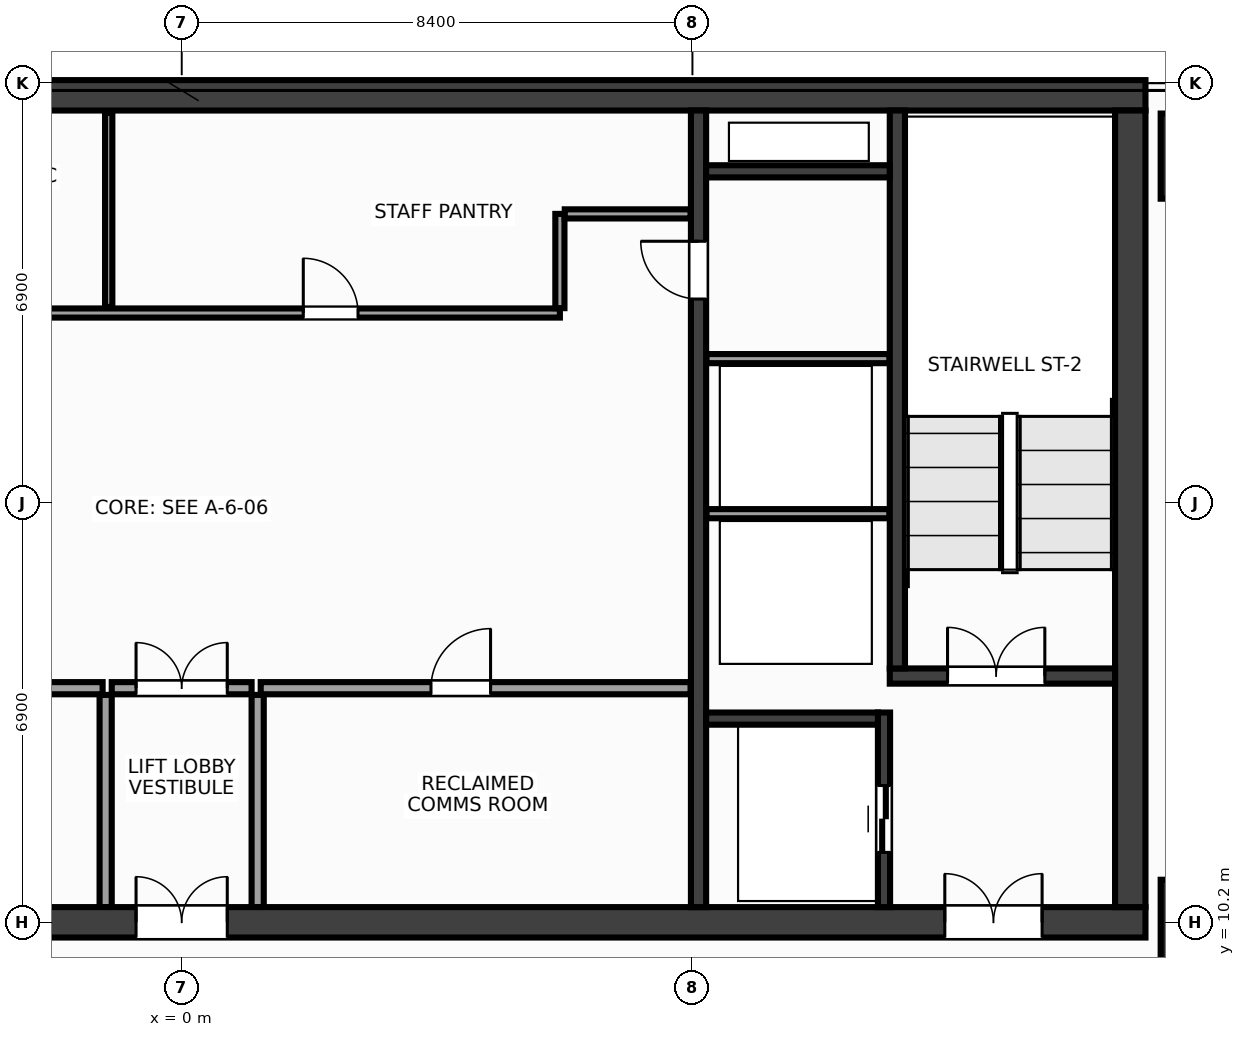
"""IFC4 building model, lengths in metres.
Left out: names, types, materials, properties, quantities, classifications, styles, units other than length and angle.
Written with IfcOpenShell. Run it as: python <this file> out.ifc"""

import sys

from ifc_helpers import new_model, si_unit, direction, frame, frame_2d, origin, origin_2d, place, context, subcontext, project, spatial, rectangle, extrude, source, transform, mapped, element, fill, save


model = new_model("IFC4")
c1 = context("Model", 3, precision=1e-05, world=origin(), true_north=direction((0.0, 1.0)))
c2 = subcontext(c1, "Body", "Model", "MODEL_VIEW")
j1 = project(units=[si_unit("LENGTHUNIT", "METRE"), si_unit("PLANEANGLEUNIT", "RADIAN")], contexts=[c1])
p1 = place(None, origin())
s1 = spatial("IfcSite", under=j1, at=p1, CompositionType="ELEMENT")
p2 = place(p1, origin())
s2 = spatial("IfcBuilding", under=s1, at=p2, CompositionType="ELEMENT")
p3 = place(p2, frame((0.0, 0.0, 203.6)))
s3 = spatial("IfcBuildingStorey", under=s2, at=p3, CompositionType="ELEMENT", Elevation=203.6)
m1 = source(origin(), c2, "Body", "SweptSolid", [
    extrude(rectangle(XDim=31.7, YDim=0.5, at=frame_2d((15.85, 0.0))), origin(), (0.0, 0.0, 1.0), 3.6),
])
p4 = place(p3, frame((-15.85, 23.8, 0.0), z_axis=(0.0, 0.0, 1.0), x_axis=(1.0, 0.0, 0.0)))
e1 = element("IfcWall", 1, at=p4, inside=s3, PredefinedType="SHEAR", context=c2, shape_type="MappedRepresentation", body=[
    mapped(m1, transform((0.0, 0.0, 0.0), x_axis=(1.0, 0.0, 0.0), y_axis=(0.0, 1.0, 0.0), z_axis=(0.0, 0.0, 1.0), scale=1.0)),
])
p5 = place(p3, frame((-15.85, 10.2, 0.0), z_axis=(0.0, 0.0, 1.0), x_axis=(1.0, 0.0, 0.0)))
e2 = element("IfcWall", 2, at=p5, inside=s3, PredefinedType="SHEAR", context=c2, shape_type="MappedRepresentation", body=[
    mapped(m1, transform((0.0, 0.0, 0.0), x_axis=(1.0, 0.0, 0.0), y_axis=(0.0, 1.0, 0.0), z_axis=(0.0, 0.0, 1.0), scale=1.0)),
])
p6 = place(p5, frame((1.7, 0.0, 0.0)))
e3 = element("IfcOpeningElement", 3, at=p6, cuts=e2, PredefinedType="OPENING", context=c2, shape_type="SweptSolid", body=[
    extrude(rectangle(XDim=1.6, YDim=2.15, at=frame_2d((0.8, 1.075))), frame((0.0, 0.262, 0.0), z_axis=(0.0, -1.0, 0.0), x_axis=(1.0, 0.0, 0.0)), (0.0, 0.0, 1.0), 0.524),
])
p7 = place(p5, frame((28.4, 0.0, 0.0)))
e4 = element("IfcOpeningElement", 4, at=p7, cuts=e2, PredefinedType="OPENING", context=c2, shape_type="SweptSolid", body=[
    extrude(rectangle(XDim=1.6, YDim=2.15, at=frame_2d((0.8, 1.075))), frame((0.0, 0.262, 0.0), z_axis=(0.0, -1.0, 0.0), x_axis=(1.0, 0.0, 0.0)), (0.0, 0.0, 1.0), 0.524),
])
p8 = place(p5, frame((15.1, 0.0, 0.0)))
e5 = element("IfcOpeningElement", 5, at=p8, cuts=e2, PredefinedType="OPENING", context=c2, shape_type="SweptSolid", body=[
    extrude(rectangle(XDim=1.5, YDim=2.2, at=frame_2d((0.75, 1.1))), frame((0.0, 0.262, 0.0), z_axis=(0.0, -1.0, 0.0), x_axis=(1.0, 0.0, 0.0)), (0.0, 0.0, 1.0), 0.524),
])
m2 = source(origin(), c2, "Body", "SweptSolid", [
    extrude(rectangle(XDim=13.1, YDim=0.5, at=frame_2d((6.55, 0.0))), origin(), (0.0, 0.0, 1.0), 3.6),
])
p9 = place(p3, frame((15.6, 10.45, 0.0), z_axis=(0.0, 0.0, 1.0), x_axis=(0.0, 1.0, 0.0)))
e6 = element("IfcWall", 6, at=p9, inside=s3, PredefinedType="SHEAR", context=c2, shape_type="MappedRepresentation", body=[
    mapped(m2, transform((0.0, 0.0, 0.0), x_axis=(1.0, 0.0, 0.0), y_axis=(0.0, 1.0, 0.0), z_axis=(0.0, 0.0, 1.0), scale=1.0)),
])
m3 = source(origin(), c2, "Body", "SweptSolid", [
    extrude(rectangle(XDim=13.1, YDim=0.25, at=frame_2d((6.55, 0.0))), origin(), (0.0, 0.0, 1.0), 3.6),
])
p10 = place(p3, frame((8.5, 10.45, 0.0), z_axis=(0.0, 0.0, 1.0), x_axis=(0.0, 1.0, 0.0)))
e7 = element("IfcWall", 7, at=p10, inside=s3, PredefinedType="SHEAR", context=c2, shape_type="MappedRepresentation", body=[
    mapped(m3, transform((0.0, 0.0, 0.0), x_axis=(1.0, 0.0, 0.0), y_axis=(0.0, 1.0, 0.0), z_axis=(0.0, 0.0, 1.0), scale=1.0)),
])
p11 = place(p10, frame((10.0, 0.0, 0.0)))
e8 = element("IfcOpeningElement", 8, at=p11, cuts=e7, PredefinedType="OPENING", context=c2, shape_type="SweptSolid", body=[
    extrude(rectangle(XDim=0.95, YDim=2.15, at=frame_2d((0.475, 1.075))), frame((0.0, 0.137, 0.0), z_axis=(0.0, -1.0, 0.0), x_axis=(1.0, 0.0, 0.0)), (0.0, 0.0, 1.0), 0.274),
])
m4 = source(origin(), c2, "Body", "SweptSolid", [
    extrude(rectangle(XDim=3.705, YDim=0.25, at=frame_2d((1.853, 0.0))), origin(), (0.0, 0.0, 1.0), 3.6),
])
p12 = place(p3, frame((11.645, 14.25, 0.0), z_axis=(0.0, 0.0, 1.0), x_axis=(1.0, 0.0, 0.0)))
e9 = element("IfcWall", 9, at=p12, inside=s3, PredefinedType="SHEAR", context=c2, shape_type="MappedRepresentation", body=[
    mapped(m4, transform((0.0, 0.0, 0.0), x_axis=(1.0, 0.0, 0.0), y_axis=(0.0, 1.0, 0.0), z_axis=(0.0, 0.0, 1.0), scale=1.0)),
])
p13 = place(p12, frame((0.95, 0.0, 0.0)))
e10 = element("IfcOpeningElement", 10, at=p13, cuts=e9, PredefinedType="OPENING", context=c2, shape_type="SweptSolid", body=[
    extrude(rectangle(XDim=1.6, YDim=2.15, at=frame_2d((0.8, 1.075))), frame((0.0, 0.137, 0.0), z_axis=(0.0, -1.0, 0.0), x_axis=(1.0, 0.0, 0.0)), (0.0, 0.0, 1.0), 0.274),
])
m5 = source(origin(), c2, "Body", "SweptSolid", [
    extrude(rectangle(XDim=9.175, YDim=0.25, at=frame_2d((4.587, 0.0))), origin(), (0.0, 0.0, 1.0), 3.6),
])
p14 = place(p3, frame((11.77, 14.375, 0.0), z_axis=(0.0, 0.0, 1.0), x_axis=(0.0, 1.0, 0.0)))
e11 = element("IfcWall", 11, at=p14, inside=s3, PredefinedType="SHEAR", context=c2, shape_type="MappedRepresentation", body=[
    mapped(m5, transform((0.0, 0.0, 0.0), x_axis=(1.0, 0.0, 0.0), y_axis=(0.0, 1.0, 0.0), z_axis=(0.0, 0.0, 1.0), scale=1.0)),
])
m6 = source(origin(), c2, "Body", "SweptSolid", [
    extrude(rectangle(XDim=3.2, YDim=0.2, at=frame_2d((1.6, 0.0))), origin(), (0.0, 0.0, 1.0), 3.6),
])
p15 = place(p3, frame((11.55, 10.45, 0.0), z_axis=(0.0, 0.0, 1.0), x_axis=(0.0, 1.0, 0.0)))
e12 = element("IfcWall", 12, at=p15, inside=s3, PredefinedType="SHEAR", context=c2, shape_type="MappedRepresentation", body=[
    mapped(m6, transform((0.0, 0.0, 0.0), x_axis=(1.0, 0.0, 0.0), y_axis=(0.0, 1.0, 0.0), z_axis=(0.0, 0.0, 1.0), scale=1.0)),
])
p16 = place(p15, frame((0.9, 0.0, 0.0)))
e13 = element("IfcOpeningElement", 13, at=p16, cuts=e12, PredefinedType="OPENING", context=c2, shape_type="SweptSolid", body=[
    extrude(rectangle(XDim=1.1, YDim=2.15, at=frame_2d((0.55, 1.075))), frame((0.0, 0.112, 0.0), z_axis=(0.0, -1.0, 0.0), x_axis=(1.0, 0.0, 0.0)), (0.0, 0.0, 1.0), 0.224),
])
m7 = source(origin(), c2, "Body", "SweptSolid", [
    extrude(rectangle(XDim=2.825, YDim=0.2, at=frame_2d((1.413, 0.0))), origin(), (0.0, 0.0, 1.0), 3.6),
])
p17 = place(p3, frame((8.625, 13.55, 0.0), z_axis=(0.0, 0.0, 1.0), x_axis=(1.0, 0.0, 0.0)))
e14 = element("IfcWall", 14, at=p17, inside=s3, PredefinedType="SHEAR", context=c2, shape_type="MappedRepresentation", body=[
    mapped(m7, transform((0.0, 0.0, 0.0), x_axis=(1.0, 0.0, 0.0), y_axis=(0.0, 1.0, 0.0), z_axis=(0.0, 0.0, 1.0), scale=1.0)),
])
m8 = source(origin(), c2, "Body", "SweptSolid", [
    extrude(rectangle(XDim=3.02, YDim=0.2, at=frame_2d((1.51, 0.0))), origin(), (0.0, 0.0, 1.0), 3.6),
])
p18 = place(p3, frame((8.625, 22.55, 0.0), z_axis=(0.0, 0.0, 1.0), x_axis=(1.0, 0.0, 0.0)))
e15 = element("IfcWall", 15, at=p18, inside=s3, PredefinedType="SHEAR", context=c2, shape_type="MappedRepresentation", body=[
    mapped(m8, transform((0.0, 0.0, 0.0), x_axis=(1.0, 0.0, 0.0), y_axis=(0.0, 1.0, 0.0), z_axis=(0.0, 0.0, 1.0), scale=1.0)),
])
m9 = source(origin(), c2, "Body", "SweptSolid", [
    extrude(rectangle(XDim=1.4, YDim=1.4, at=origin_2d()), origin(), (0.0, 0.0, 1.0), 3.6),
])
for number, where, z_axis, x_axis in (
    (16, (16.8, 10.2, 0.0), (0.0, 0.0, 1.0), (1.0, 0.0, 0.0)),
    (17, (16.8, 22.8, 0.0), (0.0, 0.0, 1.0), (1.0, 0.0, 0.0)),
):
    element("IfcColumn", number, at=place(p3, frame(where, z_axis=z_axis, x_axis=x_axis)), inside=s3, PredefinedType="COLUMN", context=c2, shape_type="MappedRepresentation", body=[
        mapped(m9, transform((0.0, 0.0, 0.0), x_axis=(1.0, 0.0, 0.0), y_axis=(0.0, 1.0, 0.0), z_axis=(0.0, 0.0, 1.0), scale=1.0)),
    ])
m10 = source(origin(), c2, "Body", "SweptSolid", [
    extrude(rectangle(XDim=3.01, YDim=0.15, at=frame_2d((1.505, 0.0))), origin(), (0.0, 0.0, 1.0), 3.38),
])
for number, where, z_axis, x_axis in (
    (18, (8.63, 16.92, 0.0), (0.0, 0.0, 1.0), (1.0, 0.0, 0.0)),
    (19, (8.63, 19.47, 0.0), (0.0, 0.0, 1.0), (1.0, 0.0, 0.0)),
):
    element("IfcWall", number, at=place(p3, frame(where, z_axis=z_axis, x_axis=x_axis)), inside=s3, PredefinedType="PARTITIONING", context=c2, shape_type="MappedRepresentation", body=[
        mapped(m10, transform((0.0, 0.0, 0.0), x_axis=(1.0, 0.0, 0.0), y_axis=(0.0, 1.0, 0.0), z_axis=(0.0, 0.0, 1.0), scale=1.0)),
    ])
m11 = source(origin(), c2, "Body", "SweptSolid", [
    extrude(rectangle(XDim=7.07, YDim=0.2, at=frame_2d((3.535, 0.0))), origin(), (0.0, 0.0, 1.0), 3.38),
])
p19 = place(p3, frame((-8.37, 14.05, 0.0), z_axis=(0.0, 0.0, 1.0), x_axis=(1.0, 0.0, 0.0)))
e20 = element("IfcWall", 20, at=p19, inside=s3, PredefinedType="PARTITIONING", context=c2, shape_type="MappedRepresentation", body=[
    mapped(m11, transform((0.0, 0.0, 0.0), x_axis=(1.0, 0.0, 0.0), y_axis=(0.0, 1.0, 0.0), z_axis=(0.0, 0.0, 1.0), scale=1.0)),
])
p20 = place(p19, frame((2.8, 0.0, 0.0)))
e21 = element("IfcOpeningElement", 21, at=p20, cuts=e20, PredefinedType="OPENING", context=c2, shape_type="SweptSolid", body=[
    extrude(rectangle(XDim=0.98, YDim=2.15, at=frame_2d((0.49, 1.075))), frame((0.0, 0.112, 0.0), z_axis=(0.0, -1.0, 0.0), x_axis=(1.0, 0.0, 0.0)), (0.0, 0.0, 1.0), 0.224),
])
p21 = place(p3, frame((1.3, 14.05, 0.0), z_axis=(0.0, 0.0, 1.0), x_axis=(1.0, 0.0, 0.0)))
e22 = element("IfcWall", 22, at=p21, inside=s3, PredefinedType="PARTITIONING", context=c2, shape_type="MappedRepresentation", body=[
    mapped(m11, transform((0.0, 0.0, 0.0), x_axis=(1.0, 0.0, 0.0), y_axis=(0.0, 1.0, 0.0), z_axis=(0.0, 0.0, 1.0), scale=1.0)),
])
p22 = place(p21, frame((2.8, 0.0, 0.0)))
e23 = element("IfcOpeningElement", 23, at=p22, cuts=e22, PredefinedType="OPENING", context=c2, shape_type="SweptSolid", body=[
    extrude(rectangle(XDim=0.98, YDim=2.15, at=frame_2d((0.49, 1.075))), frame((0.0, 0.112, 0.0), z_axis=(0.0, -1.0, 0.0), x_axis=(1.0, 0.0, 0.0)), (0.0, 0.0, 1.0), 0.224),
])
m12 = source(origin(), c2, "Body", "SweptSolid", [
    extrude(rectangle(XDim=3.49, YDim=0.2, at=frame_2d((1.745, 0.0))), origin(), (0.0, 0.0, 1.0), 3.38),
])
for number, where, z_axis, x_axis in (
    (24, (-1.25, 10.45, 0.0), (0.0, 0.0, 1.0), (0.0, 1.0, 0.0)),
    (25, (1.25, 10.45, 0.0), (0.0, 0.0, 1.0), (0.0, 1.0, 0.0)),
):
    element("IfcWall", number, at=place(p3, frame(where, z_axis=z_axis, x_axis=x_axis)), inside=s3, PredefinedType="PARTITIONING", context=c2, shape_type="MappedRepresentation", body=[
        mapped(m12, transform((0.0, 0.0, 0.0), x_axis=(1.0, 0.0, 0.0), y_axis=(0.0, 1.0, 0.0), z_axis=(0.0, 0.0, 1.0), scale=1.0)),
    ])
m13 = source(origin(), c2, "Body", "SweptSolid", [
    extrude(rectangle(XDim=2.3, YDim=0.2, at=frame_2d((1.15, 0.0))), origin(), (0.0, 0.0, 1.0), 3.38),
])
p23 = place(p3, frame((-1.15, 14.05, 0.0), z_axis=(0.0, 0.0, 1.0), x_axis=(1.0, 0.0, 0.0)))
e26 = element("IfcWall", 26, at=p23, inside=s3, PredefinedType="PARTITIONING", context=c2, shape_type="MappedRepresentation", body=[
    mapped(m13, transform((0.0, 0.0, 0.0), x_axis=(1.0, 0.0, 0.0), y_axis=(0.0, 1.0, 0.0), z_axis=(0.0, 0.0, 1.0), scale=1.0)),
])
p24 = place(p23, frame((0.4, 0.0, 0.0)))
e27 = element("IfcOpeningElement", 27, at=p24, cuts=e26, PredefinedType="OPENING", context=c2, shape_type="SweptSolid", body=[
    extrude(rectangle(XDim=1.5, YDim=2.2, at=frame_2d((0.75, 1.1))), frame((0.0, 0.112, 0.0), z_axis=(0.0, -1.0, 0.0), x_axis=(1.0, 0.0, 0.0)), (0.0, 0.0, 1.0), 0.224),
])
m14 = source(origin(), c2, "Body", "SweptSolid", [
    extrude(rectangle(XDim=14.59, YDim=0.15, at=frame_2d((7.295, 0.0))), origin(), (0.0, 0.0, 1.0), 3.38),
])
p25 = place(p3, frame((-8.37, 20.22, 0.0), z_axis=(0.0, 0.0, 1.0), x_axis=(1.0, 0.0, 0.0)))
e28 = element("IfcWall", 28, at=p25, inside=s3, PredefinedType="PARTITIONING", context=c2, shape_type="MappedRepresentation", body=[
    mapped(m14, transform((0.0, 0.0, 0.0), x_axis=(1.0, 0.0, 0.0), y_axis=(0.0, 1.0, 0.0), z_axis=(0.0, 0.0, 1.0), scale=1.0)),
])
p26 = place(p25, frame((1.36, 0.0, 0.0)))
e29 = element("IfcOpeningElement", 29, at=p26, cuts=e28, PredefinedType="OPENING", context=c2, shape_type="SweptSolid", body=[
    extrude(rectangle(XDim=0.9, YDim=2.15, at=frame_2d((0.45, 1.075))), frame((0.0, 0.087, 0.0), z_axis=(0.0, -1.0, 0.0), x_axis=(1.0, 0.0, 0.0)), (0.0, 0.0, 1.0), 0.174),
])
p27 = place(p25, frame((4.92, 0.0, 0.0)))
e30 = element("IfcOpeningElement", 30, at=p27, cuts=e28, PredefinedType="OPENING", context=c2, shape_type="SweptSolid", body=[
    extrude(rectangle(XDim=0.9, YDim=2.15, at=frame_2d((0.45, 1.075))), frame((0.0, 0.087, 0.0), z_axis=(0.0, -1.0, 0.0), x_axis=(1.0, 0.0, 0.0)), (0.0, 0.0, 1.0), 0.174),
])
p28 = place(p25, frame((10.37, 0.0, 0.0)))
e31 = element("IfcOpeningElement", 31, at=p28, cuts=e28, PredefinedType="OPENING", context=c2, shape_type="SweptSolid", body=[
    extrude(rectangle(XDim=0.9, YDim=2.15, at=frame_2d((0.45, 1.075))), frame((0.0, 0.087, 0.0), z_axis=(0.0, -1.0, 0.0), x_axis=(1.0, 0.0, 0.0)), (0.0, 0.0, 1.0), 0.174),
])
m15 = source(origin(), c2, "Body", "SweptSolid", [
    extrude(rectangle(XDim=1.55, YDim=0.15, at=frame_2d((0.775, 0.0))), origin(), (0.0, 0.0, 1.0), 3.38),
])
p29 = place(p3, frame((6.22, 20.3, 0.0), z_axis=(0.0, 0.0, 1.0), x_axis=(0.0, 1.0, 0.0)))
e32 = element("IfcWall", 32, at=p29, inside=s3, PredefinedType="PARTITIONING", context=c2, shape_type="MappedRepresentation", body=[
    mapped(m15, transform((0.0, 0.0, 0.0), x_axis=(1.0, 0.0, 0.0), y_axis=(0.0, 1.0, 0.0), z_axis=(0.0, 0.0, 1.0), scale=1.0)),
])
m16 = source(origin(), c2, "Body", "SweptSolid", [
    extrude(rectangle(XDim=2.07, YDim=0.15, at=frame_2d((1.035, 0.0))), origin(), (0.0, 0.0, 1.0), 3.38),
])
p30 = place(p3, frame((6.3, 21.85, 0.0), z_axis=(0.0, 0.0, 1.0), x_axis=(1.0, 0.0, 0.0)))
e33 = element("IfcWall", 33, at=p30, inside=s3, PredefinedType="PARTITIONING", context=c2, shape_type="MappedRepresentation", body=[
    mapped(m16, transform((0.0, 0.0, 0.0), x_axis=(1.0, 0.0, 0.0), y_axis=(0.0, 1.0, 0.0), z_axis=(0.0, 0.0, 1.0), scale=1.0)),
])
m17 = source(origin(), c2, "Body", "SweptSolid", [
    extrude(rectangle(XDim=3.19, YDim=0.12, at=frame_2d((1.595, 0.0))), origin(), (0.0, 0.0, 1.0), 3.38),
])
p31 = place(p3, frame((-1.2, 20.32, 0.0), z_axis=(0.0, 0.0, 1.0), x_axis=(0.0, 1.0, 0.0)))
e34 = element("IfcWall", 34, at=p31, inside=s3, PredefinedType="PARTITIONING", context=c2, shape_type="MappedRepresentation", body=[
    mapped(m17, transform((0.0, 0.0, 0.0), x_axis=(1.0, 0.0, 0.0), y_axis=(0.0, 1.0, 0.0), z_axis=(0.0, 0.0, 1.0), scale=1.0)),
])
m18 = source(origin(), c2, "Body", "SweptSolid", [
    extrude(rectangle(XDim=1.6, YDim=2.15, at=frame_2d((0.8, 1.075))), frame((0.0, 0.025, 0.0), z_axis=(0.0, -1.0, 0.0), x_axis=(1.0, 0.0, 0.0)), (0.0, 0.0, 1.0), 0.05),
])
p32 = place(p13, origin())
e35 = element("IfcDoor", 35, at=p32, inside=s3, OperationType="DOUBLE_DOOR_SINGLE_SWING", PredefinedType="DOOR", context=c2, shape_type="MappedRepresentation", body=[
    mapped(m18, transform((0.0, 0.0, 0.0), x_axis=(1.0, 0.0, 0.0), y_axis=(0.0, 1.0, 0.0), z_axis=(0.0, 0.0, 1.0), scale=1.0)),
])
fill(e10, e35)
p33 = place(p7, origin())
e36 = element("IfcDoor", 36, at=p33, inside=s3, OperationType="DOUBLE_DOOR_SINGLE_SWING", PredefinedType="DOOR", context=c2, shape_type="MappedRepresentation", body=[
    mapped(m18, transform((0.0, 0.0, 0.0), x_axis=(1.0, 0.0, 0.0), y_axis=(0.0, 1.0, 0.0), z_axis=(0.0, 0.0, 1.0), scale=1.0)),
])
fill(e4, e36)
m19 = source(origin(), c2, "Body", "SweptSolid", [
    extrude(rectangle(XDim=1.1, YDim=2.15, at=frame_2d((0.55, 1.075))), frame((0.0, 0.025, 0.0), z_axis=(0.0, -1.0, 0.0), x_axis=(1.0, 0.0, 0.0)), (0.0, 0.0, 1.0), 0.05),
])
p34 = place(p16, origin())
e37 = element("IfcDoor", 37, at=p34, inside=s3, OperationType="DOUBLE_DOOR_SLIDING", PredefinedType="DOOR", context=c2, shape_type="MappedRepresentation", body=[
    mapped(m19, transform((0.0, 0.0, 0.0), x_axis=(1.0, 0.0, 0.0), y_axis=(0.0, 1.0, 0.0), z_axis=(0.0, 0.0, 1.0), scale=1.0)),
])
fill(e13, e37)
m20 = source(origin(), c2, "Body", "SweptSolid", [
    extrude(rectangle(XDim=0.95, YDim=2.15, at=frame_2d((0.475, 1.075))), frame((0.0, 0.025, 0.0), z_axis=(0.0, -1.0, 0.0), x_axis=(1.0, 0.0, 0.0)), (0.0, 0.0, 1.0), 0.05),
])
p35 = place(p11, origin())
e38 = element("IfcDoor", 38, at=p35, inside=s3, OperationType="SINGLE_SWING_RIGHT", PredefinedType="DOOR", context=c2, shape_type="MappedRepresentation", body=[
    mapped(m20, transform((0.0, 0.0, 0.0), x_axis=(1.0, 0.0, 0.0), y_axis=(0.0, 1.0, 0.0), z_axis=(0.0, 0.0, 1.0), scale=1.0)),
])
fill(e8, e38)
m21 = source(origin(), c2, "Body", "SweptSolid", [
    extrude(rectangle(XDim=0.98, YDim=2.15, at=frame_2d((0.49, 1.075))), frame((0.0, 0.025, 0.0), z_axis=(0.0, -1.0, 0.0), x_axis=(1.0, 0.0, 0.0)), (0.0, 0.0, 1.0), 0.05),
])
p36 = place(p22, origin())
e39 = element("IfcDoor", 39, at=p36, inside=s3, OperationType="SINGLE_SWING_RIGHT", PredefinedType="DOOR", context=c2, shape_type="MappedRepresentation", body=[
    mapped(m21, transform((0.0, 0.0, 0.0), x_axis=(1.0, 0.0, 0.0), y_axis=(0.0, 1.0, 0.0), z_axis=(0.0, 0.0, 1.0), scale=1.0)),
])
fill(e23, e39)
m22 = source(origin(), c2, "Body", "SweptSolid", [
    extrude(rectangle(XDim=1.5, YDim=2.2, at=frame_2d((0.75, 1.1))), frame((0.0, 0.025, 0.0), z_axis=(0.0, -1.0, 0.0), x_axis=(1.0, 0.0, 0.0)), (0.0, 0.0, 1.0), 0.05),
])
p37 = place(p24, origin())
e40 = element("IfcDoor", 40, at=p37, inside=s3, OperationType="DOUBLE_DOOR_SINGLE_SWING", PredefinedType="DOOR", context=c2, shape_type="MappedRepresentation", body=[
    mapped(m22, transform((0.0, 0.0, 0.0), x_axis=(1.0, 0.0, 0.0), y_axis=(0.0, 1.0, 0.0), z_axis=(0.0, 0.0, 1.0), scale=1.0)),
])
fill(e27, e40)
p38 = place(p8, origin())
e41 = element("IfcDoor", 41, at=p38, inside=s3, OperationType="DOUBLE_DOOR_SINGLE_SWING", PredefinedType="DOOR", context=c2, shape_type="MappedRepresentation", body=[
    mapped(m22, transform((0.0, 0.0, 0.0), x_axis=(1.0, 0.0, 0.0), y_axis=(0.0, 1.0, 0.0), z_axis=(0.0, 0.0, 1.0), scale=1.0)),
])
fill(e5, e41)
m23 = source(origin(), c2, "Body", "SweptSolid", [
    extrude(rectangle(XDim=0.9, YDim=2.15, at=frame_2d((0.45, 1.075))), frame((0.0, 0.025, 0.0), z_axis=(0.0, -1.0, 0.0), x_axis=(1.0, 0.0, 0.0)), (0.0, 0.0, 1.0), 0.05),
])
p39 = place(p28, origin())
e42 = element("IfcDoor", 42, at=p39, inside=s3, OperationType="SINGLE_SWING_LEFT", PredefinedType="DOOR", context=c2, shape_type="MappedRepresentation", body=[
    mapped(m23, transform((0.0, 0.0, 0.0), x_axis=(1.0, 0.0, 0.0), y_axis=(0.0, 1.0, 0.0), z_axis=(0.0, 0.0, 1.0), scale=1.0)),
])
fill(e31, e42)
save(model, sys.argv[1])
